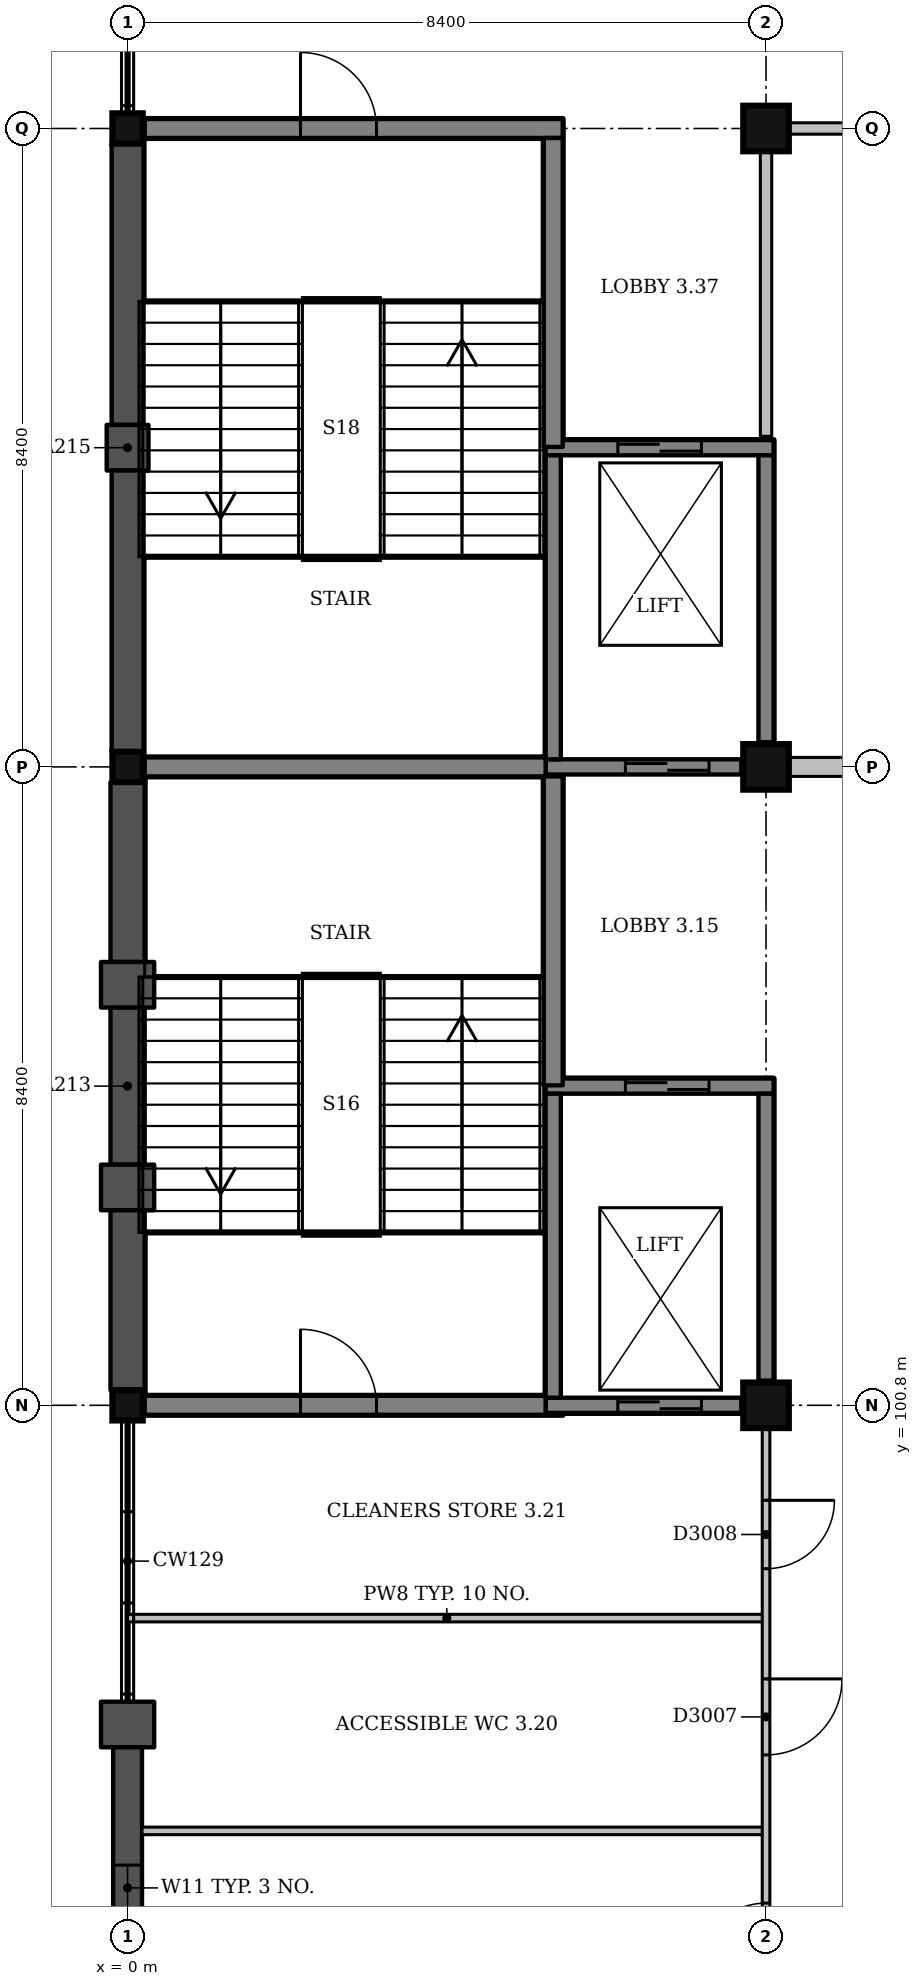
"""IFC4 building model, lengths in metres.
Left out: names, types, materials, properties, quantities, classifications, styles, units other than length and angle.
Written with IfcOpenShell. Run it as: python <this file> out.ifc"""

import sys

from ifc_helpers import new_model, si_unit, direction, frame, frame_2d, origin, origin_2d, place, context, subcontext, project, spatial, rectangle, extrude, element, fill, save


model = new_model("IFC4")
c1 = context("Model", 3, precision=1e-05, world=origin(), true_north=direction((0.0, 1.0)))
c2 = subcontext(c1, "Body", "Model", "MODEL_VIEW")
j1 = project(units=[si_unit("LENGTHUNIT", "METRE"), si_unit("PLANEANGLEUNIT", "RADIAN")], contexts=[c1])
p1 = place(None, origin())
s1 = spatial("IfcSite", under=j1, at=p1, CompositionType="ELEMENT")
p2 = place(p1, origin())
s2 = spatial("IfcBuilding", under=s1, at=p2, CompositionType="ELEMENT")
p3 = place(p2, frame((0.0, 0.0, 13.5)))
s3 = spatial("IfcBuildingStorey", under=s2, at=p3, CompositionType="ELEMENT", Elevation=13.5)
for number, where, z_axis, x_axis in (
    (1, (0.0, 100.8, 0.0), (0.0, 0.0, 1.0), (1.0, 0.0, 0.0)),
    (2, (0.0, 109.2, 0.0), (0.0, 0.0, 1.0), (1.0, 0.0, 0.0)),
):
    element("IfcColumn", number, at=place(p3, frame(where, z_axis=z_axis, x_axis=x_axis)), inside=s3, PredefinedType="COLUMN", context=c2, shape_type="SweptSolid", body=[
        extrude(rectangle(XDim=0.4, YDim=0.4, at=origin_2d()), origin(), (0.0, 0.0, 1.0), 4.5),
    ])
for number, where, z_axis, x_axis in (
    (3, (8.4, 100.8, 0.0), (0.0, 0.0, 1.0), (1.0, 0.0, 0.0)),
    (4, (8.4, 109.2, 0.0), (0.0, 0.0, 1.0), (1.0, 0.0, 0.0)),
):
    element("IfcColumn", number, at=place(p3, frame(where, z_axis=z_axis, x_axis=x_axis)), inside=s3, PredefinedType="COLUMN", context=c2, shape_type="SweptSolid", body=[
        extrude(rectangle(XDim=0.6, YDim=0.6, at=origin_2d()), origin(), (0.0, 0.0, 1.0), 4.5),
    ])
p4 = place(p3, frame((0.0, 117.6, 0.0), z_axis=(0.0, 0.0, 1.0), x_axis=(1.0, 0.0, 0.0)))
e5 = element("IfcColumn", 5, at=p4, inside=s3, PredefinedType="COLUMN", context=c2, shape_type="SweptSolid", body=[
    extrude(rectangle(XDim=0.4, YDim=0.4, at=origin_2d()), origin(), (0.0, 0.0, 1.0), 4.5),
])
p5 = place(p3, frame((8.4, 117.6, 0.0), z_axis=(0.0, 0.0, 1.0), x_axis=(1.0, 0.0, 0.0)))
e6 = element("IfcColumn", 6, at=p5, inside=s3, PredefinedType="COLUMN", context=c2, shape_type="SweptSolid", body=[
    extrude(rectangle(XDim=0.6, YDim=0.6, at=origin_2d()), origin(), (0.0, 0.0, 1.0), 4.5),
])
p6 = place(p3, frame((5.5, 100.8, 0.0), z_axis=(0.0, 0.0, 1.0), x_axis=(1.0, 0.0, 0.0)))
e7 = element("IfcWall", 7, at=p6, inside=s3, PredefinedType="SHEAR", context=c2, shape_type="SweptSolid", body=[
    extrude(rectangle(XDim=2.575, YDim=0.2, at=frame_2d((1.288, 0.0))), origin(), (0.0, 0.0, 1.0), 4.5),
])
p7 = place(p6, frame((0.95, 0.0, 0.0)))
e8 = element("IfcOpeningElement", 8, at=p7, cuts=e7, PredefinedType="OPENING", context=c2, shape_type="SweptSolid", body=[
    extrude(rectangle(XDim=1.1, YDim=2.1, at=frame_2d((0.55, 1.05))), frame((0.0, 0.11, 0.0), z_axis=(0.0, -1.0, 0.0), x_axis=(1.0, 0.0, 0.0)), (0.0, 0.0, 1.0), 0.22),
])
p8 = place(p3, frame((5.5, 105.0, 0.0), z_axis=(0.0, 0.0, 1.0), x_axis=(1.0, 0.0, 0.0)))
e9 = element("IfcWall", 9, at=p8, inside=s3, PredefinedType="SHEAR", context=c2, shape_type="SweptSolid", body=[
    extrude(rectangle(XDim=3.0, YDim=0.2, at=frame_2d((1.5, 0.0))), origin(), (0.0, 0.0, 1.0), 4.5),
])
p9 = place(p8, frame((1.05, 0.0, 0.0)))
e10 = element("IfcOpeningElement", 10, at=p9, cuts=e9, PredefinedType="OPENING", context=c2, shape_type="SweptSolid", body=[
    extrude(rectangle(XDim=1.1, YDim=2.1, at=frame_2d((0.55, 1.05))), frame((0.0, 0.11, 0.0), z_axis=(0.0, -1.0, 0.0), x_axis=(1.0, 0.0, 0.0)), (0.0, 0.0, 1.0), 0.22),
])
p10 = place(p3, frame((5.6, 100.9, 0.0), z_axis=(0.0, 0.0, 1.0), x_axis=(0.0, 1.0, 0.0)))
e11 = element("IfcWall", 11, at=p10, inside=s3, PredefinedType="SHEAR", context=c2, shape_type="SweptSolid", body=[
    extrude(rectangle(XDim=4.0, YDim=0.2, at=frame_2d((2.0, 0.0))), origin(), (0.0, 0.0, 1.0), 4.5),
])
p11 = place(p3, frame((8.4, 101.125, 0.0), z_axis=(0.0, 0.0, 1.0), x_axis=(0.0, 1.0, 0.0)))
e12 = element("IfcWall", 12, at=p11, inside=s3, PredefinedType="SHEAR", context=c2, shape_type="SweptSolid", body=[
    extrude(rectangle(XDim=3.775, YDim=0.2, at=frame_2d((1.887, 0.0))), origin(), (0.0, 0.0, 1.0), 4.5),
])
p12 = place(p3, frame((5.5, 109.2, 0.0), z_axis=(0.0, 0.0, 1.0), x_axis=(1.0, 0.0, 0.0)))
e13 = element("IfcWall", 13, at=p12, inside=s3, PredefinedType="SHEAR", context=c2, shape_type="SweptSolid", body=[
    extrude(rectangle(XDim=2.575, YDim=0.2, at=frame_2d((1.288, 0.0))), origin(), (0.0, 0.0, 1.0), 4.5),
])
p13 = place(p12, frame((1.05, 0.0, 0.0)))
e14 = element("IfcOpeningElement", 14, at=p13, cuts=e13, PredefinedType="OPENING", context=c2, shape_type="SweptSolid", body=[
    extrude(rectangle(XDim=1.1, YDim=2.1, at=frame_2d((0.55, 1.05))), frame((0.0, 0.11, 0.0), z_axis=(0.0, -1.0, 0.0), x_axis=(1.0, 0.0, 0.0)), (0.0, 0.0, 1.0), 0.22),
])
p14 = place(p3, frame((5.5, 113.4, 0.0), z_axis=(0.0, 0.0, 1.0), x_axis=(1.0, 0.0, 0.0)))
e15 = element("IfcWall", 15, at=p14, inside=s3, PredefinedType="SHEAR", context=c2, shape_type="SweptSolid", body=[
    extrude(rectangle(XDim=3.0, YDim=0.2, at=frame_2d((1.5, 0.0))), origin(), (0.0, 0.0, 1.0), 4.5),
])
p15 = place(p14, frame((0.95, 0.0, 0.0)))
e16 = element("IfcOpeningElement", 16, at=p15, cuts=e15, PredefinedType="OPENING", context=c2, shape_type="SweptSolid", body=[
    extrude(rectangle(XDim=1.1, YDim=2.1, at=frame_2d((0.55, 1.05))), frame((0.0, 0.11, 0.0), z_axis=(0.0, -1.0, 0.0), x_axis=(1.0, 0.0, 0.0)), (0.0, 0.0, 1.0), 0.22),
])
p16 = place(p3, frame((5.6, 109.3, 0.0), z_axis=(0.0, 0.0, 1.0), x_axis=(0.0, 1.0, 0.0)))
e17 = element("IfcWall", 17, at=p16, inside=s3, PredefinedType="SHEAR", context=c2, shape_type="SweptSolid", body=[
    extrude(rectangle(XDim=4.0, YDim=0.2, at=frame_2d((2.0, 0.0))), origin(), (0.0, 0.0, 1.0), 4.5),
])
p17 = place(p3, frame((8.4, 109.525, 0.0), z_axis=(0.0, 0.0, 1.0), x_axis=(0.0, 1.0, 0.0)))
e18 = element("IfcWall", 18, at=p17, inside=s3, PredefinedType="SHEAR", context=c2, shape_type="SweptSolid", body=[
    extrude(rectangle(XDim=3.775, YDim=0.2, at=frame_2d((1.888, 0.0))), origin(), (0.0, 0.0, 1.0), 4.5),
])
p18 = place(p3, frame((0.225, 100.8, 0.0), z_axis=(0.0, 0.0, 1.0), x_axis=(1.0, 0.0, 0.0)))
e19 = element("IfcWall", 19, at=p18, inside=s3, PredefinedType="SHEAR", context=c2, shape_type="SweptSolid", body=[
    extrude(rectangle(XDim=5.275, YDim=0.25, at=frame_2d((2.637, 0.0))), origin(), (0.0, 0.0, 1.0), 4.5),
])
p19 = place(p18, frame((2.05, 0.0, 0.0)))
e20 = element("IfcOpeningElement", 20, at=p19, cuts=e19, PredefinedType="OPENING", context=c2, shape_type="SweptSolid", body=[
    extrude(rectangle(XDim=1.0, YDim=2.1, at=frame_2d((0.5, 1.05))), frame((0.0, 0.135, 0.0), z_axis=(0.0, -1.0, 0.0), x_axis=(1.0, 0.0, 0.0)), (0.0, 0.0, 1.0), 0.27),
])
p20 = place(p3, frame((0.225, 109.2, 0.0), z_axis=(0.0, 0.0, 1.0), x_axis=(1.0, 0.0, 0.0)))
e21 = element("IfcWall", 21, at=p20, inside=s3, PredefinedType="SHEAR", context=c2, shape_type="SweptSolid", body=[
    extrude(rectangle(XDim=5.275, YDim=0.25, at=frame_2d((2.637, 0.0))), origin(), (0.0, 0.0, 1.0), 4.5),
])
p21 = place(p3, frame((5.6, 105.01, 0.0), z_axis=(0.0, 0.0, 1.0), x_axis=(0.0, 1.0, 0.0)))
e22 = element("IfcWall", 22, at=p21, inside=s3, PredefinedType="SHEAR", context=c2, shape_type="SweptSolid", body=[
    extrude(rectangle(XDim=4.065, YDim=0.25, at=frame_2d((2.032, 0.0))), origin(), (0.0, 0.0, 1.0), 4.5),
])
p22 = place(p3, frame((0.225, 117.6, 0.0), z_axis=(0.0, 0.0, 1.0), x_axis=(1.0, 0.0, 0.0)))
e23 = element("IfcWall", 23, at=p22, inside=s3, PredefinedType="SHEAR", context=c2, shape_type="SweptSolid", body=[
    extrude(rectangle(XDim=5.5, YDim=0.25, at=frame_2d((2.75, 0.0))), origin(), (0.0, 0.0, 1.0), 4.5),
])
p23 = place(p22, frame((2.05, 0.0, 0.0)))
e24 = element("IfcOpeningElement", 24, at=p23, cuts=e23, PredefinedType="OPENING", context=c2, shape_type="SweptSolid", body=[
    extrude(rectangle(XDim=1.0, YDim=2.1, at=frame_2d((0.5, 1.05))), frame((0.0, 0.135, 0.0), z_axis=(0.0, -1.0, 0.0), x_axis=(1.0, 0.0, 0.0)), (0.0, 0.0, 1.0), 0.27),
])
p24 = place(p3, frame((5.6, 113.41, 0.0), z_axis=(0.0, 0.0, 1.0), x_axis=(0.0, 1.0, 0.0)))
e25 = element("IfcWall", 25, at=p24, inside=s3, PredefinedType="SHEAR", context=c2, shape_type="SweptSolid", body=[
    extrude(rectangle(XDim=4.065, YDim=0.25, at=frame_2d((2.033, 0.0))), origin(), (0.0, 0.0, 1.0), 4.5),
])
p25 = place(p3, frame((0.0, 109.0, 0.0), z_axis=(0.0, 0.0, 1.0), x_axis=(0.0, -1.0, 0.0)))
e26 = element("IfcWall", 26, at=p25, inside=s3, PredefinedType="SOLIDWALL", context=c2, shape_type="SweptSolid", body=[
    extrude(rectangle(XDim=2.367, YDim=0.45, at=frame_2d((1.183, 0.0))), origin(), (0.0, 0.0, 1.0), 3.65),
])
p26 = place(p3, frame((0.0, 106.633, 0.0), z_axis=(0.0, 0.0, 1.0), x_axis=(0.0, -1.0, 0.0)))
e27 = element("IfcWall", 27, at=p26, inside=s3, PredefinedType="SOLIDWALL", context=c2, shape_type="SweptSolid", body=[
    extrude(rectangle(XDim=0.6, YDim=0.7, at=frame_2d((0.3, 0.0))), origin(), (0.0, 0.0, 1.0), 3.65),
])
p27 = place(p3, frame((0.0, 106.033, 0.0), z_axis=(0.0, 0.0, 1.0), x_axis=(0.0, -1.0, 0.0)))
e28 = element("IfcWall", 28, at=p27, inside=s3, PredefinedType="SOLIDWALL", context=c2, shape_type="SweptSolid", body=[
    extrude(rectangle(XDim=2.066, YDim=0.45, at=frame_2d((1.033, 0.0))), origin(), (0.0, 0.0, 1.0), 3.65),
])
p28 = place(p3, frame((0.0, 103.967, 0.0), z_axis=(0.0, 0.0, 1.0), x_axis=(0.0, -1.0, 0.0)))
e29 = element("IfcWall", 29, at=p28, inside=s3, PredefinedType="SOLIDWALL", context=c2, shape_type="SweptSolid", body=[
    extrude(rectangle(XDim=0.6, YDim=0.7, at=frame_2d((0.3, 0.0))), origin(), (0.0, 0.0, 1.0), 3.65),
])
p29 = place(p3, frame((0.0, 103.367, 0.0), z_axis=(0.0, 0.0, 1.0), x_axis=(0.0, -1.0, 0.0)))
e30 = element("IfcWall", 30, at=p29, inside=s3, PredefinedType="SOLIDWALL", context=c2, shape_type="SweptSolid", body=[
    extrude(rectangle(XDim=2.367, YDim=0.45, at=frame_2d((1.183, 0.0))), origin(), (0.0, 0.0, 1.0), 3.65),
])
p30 = place(p3, frame((0.0, 96.9, 0.0), z_axis=(0.0, 0.0, 1.0), x_axis=(0.0, -1.0, 0.0)))
e31 = element("IfcWall", 31, at=p30, inside=s3, PredefinedType="SOLIDWALL", context=c2, shape_type="SweptSolid", body=[
    extrude(rectangle(XDim=0.6, YDim=0.7, at=frame_2d((0.3, 0.0))), origin(), (0.0, 0.0, 1.0), 3.35),
])
p31 = place(p3, frame((0.0, 96.3, 0.0), z_axis=(0.0, 0.0, 1.0), x_axis=(0.0, -1.0, 0.0)))
e32 = element("IfcWall", 32, at=p31, inside=s3, PredefinedType="SOLIDWALL", context=c2, shape_type="SweptSolid", body=[
    extrude(rectangle(XDim=3.7, YDim=0.38, at=frame_2d((1.85, 0.0))), origin(), (0.0, 0.0, 1.0), 3.35),
])
p32 = place(p31, frame((1.55, 0.0, 1.5)))
e33 = element("IfcOpeningElement", 33, at=p32, cuts=e32, PredefinedType="OPENING", context=c2, shape_type="SweptSolid", body=[
    extrude(rectangle(XDim=0.6, YDim=1.2, at=frame_2d((0.3, 0.6))), frame((0.0, 0.2, 0.0), z_axis=(0.0, -1.0, 0.0), x_axis=(1.0, 0.0, 0.0)), (0.0, 0.0, 1.0), 0.4),
])
p33 = place(p3, frame((0.0, 117.4, 0.0), z_axis=(0.0, 0.0, 1.0), x_axis=(0.0, -1.0, 0.0)))
e34 = element("IfcWall", 34, at=p33, inside=s3, PredefinedType="SOLIDWALL", context=c2, shape_type="SweptSolid", body=[
    extrude(rectangle(XDim=3.7, YDim=0.42, at=frame_2d((1.85, 0.0))), origin(), (0.0, 0.0, 1.0), 4.5),
])
p34 = place(p3, frame((0.0, 113.7, 0.0), z_axis=(0.0, 0.0, 1.0), x_axis=(0.0, -1.0, 0.0)))
e35 = element("IfcWall", 35, at=p34, inside=s3, PredefinedType="SOLIDWALL", context=c2, shape_type="SweptSolid", body=[
    extrude(rectangle(XDim=0.6, YDim=0.55, at=frame_2d((0.3, 0.0))), origin(), (0.0, 0.0, 1.0), 4.5),
])
p35 = place(p3, frame((0.0, 113.1, 0.0), z_axis=(0.0, 0.0, 1.0), x_axis=(0.0, -1.0, 0.0)))
e36 = element("IfcWall", 36, at=p35, inside=s3, PredefinedType="SOLIDWALL", context=c2, shape_type="SweptSolid", body=[
    extrude(rectangle(XDim=3.7, YDim=0.42, at=frame_2d((1.85, 0.0))), origin(), (0.0, 0.0, 1.0), 4.5),
])
p36 = place(p3, frame((0.19, 95.2, 0.0), z_axis=(0.0, 0.0, 1.0), x_axis=(1.0, 0.0, 0.0)))
e37 = element("IfcWall", 37, at=p36, inside=s3, PredefinedType="PARTITIONING", context=c2, shape_type="SweptSolid", body=[
    extrude(rectangle(XDim=8.21, YDim=0.1, at=frame_2d((4.105, 0.0))), origin(), (0.0, 0.0, 1.0), 3.35),
])
p37 = place(p3, frame((0.0, 98.0, 0.0), z_axis=(0.0, 0.0, 1.0), x_axis=(1.0, 0.0, 0.0)))
e38 = element("IfcWall", 38, at=p37, inside=s3, PredefinedType="PARTITIONING", context=c2, shape_type="SweptSolid", body=[
    extrude(rectangle(XDim=8.4, YDim=0.1, at=frame_2d((4.2, 0.0))), origin(), (0.0, 0.0, 1.0), 3.27),
])
p38 = place(p3, frame((8.7, 109.2, 0.0), z_axis=(0.0, 0.0, 1.0), x_axis=(1.0, 0.0, 0.0)))
e39 = element("IfcWall", 39, at=p38, inside=s3, PredefinedType="SOLIDWALL", context=c2, shape_type="SweptSolid", body=[
    extrude(rectangle(XDim=7.8, YDim=0.25, at=frame_2d((3.9, 0.0))), origin(), (0.0, 0.0, 1.0), 4.15),
])
p39 = place(p3, frame((8.7, 117.6, 0.0), z_axis=(0.0, 0.0, 1.0), x_axis=(1.0, 0.0, 0.0)))
e40 = element("IfcWall", 40, at=p39, inside=s3, PredefinedType="PARTITIONING", context=c2, shape_type="SweptSolid", body=[
    extrude(rectangle(XDim=7.8, YDim=0.15, at=frame_2d((3.9, 0.0))), origin(), (0.0, 0.0, 1.0), 3.4),
])
p40 = place(p39, frame((3.45, 0.0, 0.0)))
e41 = element("IfcOpeningElement", 41, at=p40, cuts=e40, PredefinedType="OPENING", context=c2, shape_type="SweptSolid", body=[
    extrude(rectangle(XDim=0.9, YDim=2.1, at=frame_2d((0.45, 1.05))), frame((0.0, 0.085, 0.0), z_axis=(0.0, -1.0, 0.0), x_axis=(1.0, 0.0, 0.0)), (0.0, 0.0, 1.0), 0.17),
])
p41 = place(p3, frame((8.4, 113.55, 0.0), z_axis=(0.0, 0.0, 1.0), x_axis=(0.0, 1.0, 0.0)))
e42 = element("IfcWall", 42, at=p41, inside=s3, PredefinedType="PARTITIONING", context=c2, shape_type="SweptSolid", body=[
    extrude(rectangle(XDim=3.75, YDim=0.15, at=frame_2d((1.875, 0.0))), origin(), (0.0, 0.0, 1.0), 3.4),
])
p42 = place(p3, frame((8.4, 92.7, 0.0), z_axis=(0.0, 0.0, 1.0), x_axis=(0.0, 1.0, 0.0)))
e43 = element("IfcWall", 43, at=p42, inside=s3, PredefinedType="PARTITIONING", context=c2, shape_type="SweptSolid", body=[
    extrude(rectangle(XDim=7.8, YDim=0.1, at=frame_2d((3.9, 0.0))), origin(), (0.0, 0.0, 1.0), 3.4),
])
p43 = place(p42, frame((0.65, 0.0, 0.0)))
e44 = element("IfcOpeningElement", 44, at=p43, cuts=e43, PredefinedType="OPENING", context=c2, shape_type="SweptSolid", body=[
    extrude(rectangle(XDim=0.9, YDim=2.1, at=frame_2d((0.45, 1.05))), frame((0.0, 0.06, 0.0), z_axis=(0.0, -1.0, 0.0), x_axis=(1.0, 0.0, 0.0)), (0.0, 0.0, 1.0), 0.12),
])
p44 = place(p42, frame((3.5, 0.0, 0.0)))
e45 = element("IfcOpeningElement", 45, at=p44, cuts=e43, PredefinedType="OPENING", context=c2, shape_type="SweptSolid", body=[
    extrude(rectangle(XDim=1.0, YDim=2.1, at=frame_2d((0.5, 1.05))), frame((0.0, 0.06, 0.0), z_axis=(0.0, -1.0, 0.0), x_axis=(1.0, 0.0, 0.0)), (0.0, 0.0, 1.0), 0.12),
])
p45 = place(p42, frame((5.95, 0.0, 0.0)))
e46 = element("IfcOpeningElement", 46, at=p45, cuts=e43, PredefinedType="OPENING", context=c2, shape_type="SweptSolid", body=[
    extrude(rectangle(XDim=0.9, YDim=2.1, at=frame_2d((0.45, 1.05))), frame((0.0, 0.06, 0.0), z_axis=(0.0, -1.0, 0.0), x_axis=(1.0, 0.0, 0.0)), (0.0, 0.0, 1.0), 0.12),
])
p46 = place(p32, origin())
e47 = element("IfcWindow", 47, at=p46, inside=s3, PartitioningType="SINGLE_PANEL", PredefinedType="WINDOW", context=c2, shape_type="SweptSolid", body=[
    extrude(rectangle(XDim=0.6, YDim=1.2, at=frame_2d((0.3, 0.6))), frame((0.0, 0.15, 0.0), z_axis=(0.0, -1.0, 0.0), x_axis=(1.0, 0.0, 0.0)), (0.0, 0.0, 1.0), 0.06),
])
fill(e33, e47)
p47 = place(p43, origin())
e48 = element("IfcDoor", 48, at=p47, inside=s3, OperationType="SINGLE_SWING_LEFT", PredefinedType="DOOR", context=c2, shape_type="SweptSolid", body=[
    extrude(rectangle(XDim=0.9, YDim=2.1, at=frame_2d((0.45, 1.05))), frame((0.0, 0.025, 0.0), z_axis=(0.0, -1.0, 0.0), x_axis=(1.0, 0.0, 0.0)), (0.0, 0.0, 1.0), 0.05),
])
fill(e44, e48)
p48 = place(p44, origin())
e49 = element("IfcDoor", 49, at=p48, inside=s3, OperationType="SINGLE_SWING_RIGHT", PredefinedType="DOOR", context=c2, shape_type="SweptSolid", body=[
    extrude(rectangle(XDim=1.0, YDim=2.1, at=frame_2d((0.5, 1.05))), frame((0.0, 0.025, 0.0), z_axis=(0.0, -1.0, 0.0), x_axis=(1.0, 0.0, 0.0)), (0.0, 0.0, 1.0), 0.05),
])
fill(e45, e49)
p49 = place(p45, origin())
e50 = element("IfcDoor", 50, at=p49, inside=s3, OperationType="SINGLE_SWING_RIGHT", PredefinedType="DOOR", context=c2, shape_type="SweptSolid", body=[
    extrude(rectangle(XDim=0.9, YDim=2.1, at=frame_2d((0.45, 1.05))), frame((0.0, 0.025, 0.0), z_axis=(0.0, -1.0, 0.0), x_axis=(1.0, 0.0, 0.0)), (0.0, 0.0, 1.0), 0.05),
])
fill(e46, e50)
p50 = place(p19, origin())
e51 = element("IfcDoor", 51, at=p50, inside=s3, OperationType="SINGLE_SWING_LEFT", PredefinedType="DOOR", context=c2, shape_type="SweptSolid", body=[
    extrude(rectangle(XDim=1.0, YDim=2.1, at=frame_2d((0.5, 1.05))), frame((0.0, 0.025, 0.0), z_axis=(0.0, -1.0, 0.0), x_axis=(1.0, 0.0, 0.0)), (0.0, 0.0, 1.0), 0.05),
])
fill(e20, e51)
p51 = place(p23, origin())
e52 = element("IfcDoor", 52, at=p51, inside=s3, OperationType="SINGLE_SWING_LEFT", PredefinedType="DOOR", context=c2, shape_type="SweptSolid", body=[
    extrude(rectangle(XDim=1.0, YDim=2.1, at=frame_2d((0.5, 1.05))), frame((0.0, 0.025, 0.0), z_axis=(0.0, -1.0, 0.0), x_axis=(1.0, 0.0, 0.0)), (0.0, 0.0, 1.0), 0.05),
])
fill(e24, e52)
p52 = place(p7, origin())
e53 = element("IfcDoor", 53, at=p52, inside=s3, OperationType="SLIDING_TO_LEFT", PredefinedType="DOOR", context=c2, shape_type="SweptSolid", body=[
    extrude(rectangle(XDim=1.1, YDim=2.1, at=frame_2d((0.55, 1.05))), frame((0.0, 0.025, 0.0), z_axis=(0.0, -1.0, 0.0), x_axis=(1.0, 0.0, 0.0)), (0.0, 0.0, 1.0), 0.05),
])
fill(e8, e53)
p53 = place(p9, origin())
e54 = element("IfcDoor", 54, at=p53, inside=s3, OperationType="SLIDING_TO_RIGHT", PredefinedType="DOOR", context=c2, shape_type="SweptSolid", body=[
    extrude(rectangle(XDim=1.1, YDim=2.1, at=frame_2d((0.55, 1.05))), frame((0.0, 0.025, 0.0), z_axis=(0.0, -1.0, 0.0), x_axis=(1.0, 0.0, 0.0)), (0.0, 0.0, 1.0), 0.05),
])
fill(e10, e54)
p54 = place(p13, origin())
e55 = element("IfcDoor", 55, at=p54, inside=s3, OperationType="SLIDING_TO_LEFT", PredefinedType="DOOR", context=c2, shape_type="SweptSolid", body=[
    extrude(rectangle(XDim=1.1, YDim=2.1, at=frame_2d((0.55, 1.05))), frame((0.0, 0.025, 0.0), z_axis=(0.0, -1.0, 0.0), x_axis=(1.0, 0.0, 0.0)), (0.0, 0.0, 1.0), 0.05),
])
fill(e14, e55)
p55 = place(p15, origin())
e56 = element("IfcDoor", 56, at=p55, inside=s3, OperationType="SLIDING_TO_RIGHT", PredefinedType="DOOR", context=c2, shape_type="SweptSolid", body=[
    extrude(rectangle(XDim=1.1, YDim=2.1, at=frame_2d((0.55, 1.05))), frame((0.0, 0.025, 0.0), z_axis=(0.0, -1.0, 0.0), x_axis=(1.0, 0.0, 0.0)), (0.0, 0.0, 1.0), 0.05),
])
fill(e16, e56)
save(model, sys.argv[1])
